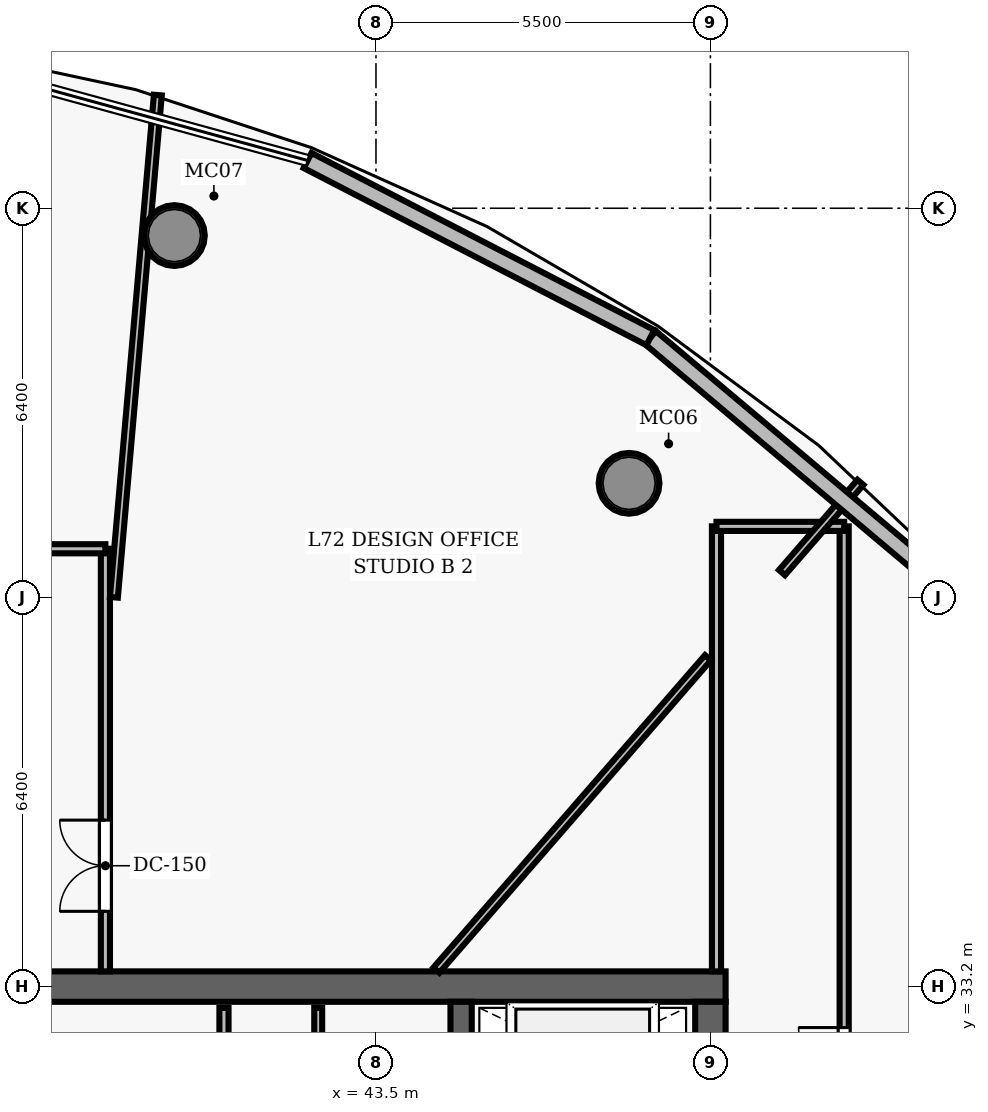
"""IFC4 building model, lengths in metres.
Left out: names, types, materials, properties, quantities, classifications, styles, units other than length and angle.
Written with IfcOpenShell. Run it as: python <this file> out.ifc"""

import sys

from ifc_helpers import new_model, si_unit, direction, frame, frame_2d, origin, origin_2d, place, context, subcontext, project, spatial, rectangle, hollow_circle, extrude, element, fill, save


model = new_model("IFC4")
c1 = context("Model", 3, precision=1e-05, world=origin(), true_north=direction((0.0, 1.0)))
c2 = subcontext(c1, "Body", "Model", "MODEL_VIEW")
j1 = project(units=[si_unit("LENGTHUNIT", "METRE"), si_unit("PLANEANGLEUNIT", "RADIAN")], contexts=[c1])
p1 = place(None, origin())
s1 = spatial("IfcSite", under=j1, at=p1, CompositionType="ELEMENT")
p2 = place(p1, origin())
s2 = spatial("IfcBuilding", under=s1, at=p2, CompositionType="ELEMENT")
p3 = place(p2, frame((0.0, 0.0, 284.4)))
s3 = spatial("IfcBuildingStorey", under=s2, at=p3, CompositionType="ELEMENT", Elevation=284.4)
p4 = place(p3, frame((26.75, 33.2, 0.0), z_axis=(0.0, 0.0, 1.0), x_axis=(1.0, 0.0, 0.0)))
e1 = element("IfcWall", 1, at=p4, inside=s3, PredefinedType="SHEAR", context=c2, shape_type="SweptSolid", body=[
    extrude(rectangle(XDim=22.5, YDim=0.5, at=frame_2d((11.25, 0.0))), origin(), (0.0, 0.0, 1.0), 3.85),
])
p5 = place(p3, frame((49.0, 19.05, 0.0), z_axis=(0.0, 0.0, 1.0), x_axis=(0.0, 1.0, 0.0)))
e2 = element("IfcWall", 2, at=p5, inside=s3, PredefinedType="SHEAR", context=c2, shape_type="SweptSolid", body=[
    extrude(rectangle(XDim=13.9, YDim=0.5, at=frame_2d((6.95, 0.0))), origin(), (0.0, 0.0, 1.0), 3.85),
])
p6 = place(p5, frame((8.2, 0.0, 0.0)))
e3 = element("IfcOpeningElement", 3, at=p6, cuts=e2, PredefinedType="OPENING", context=c2, shape_type="SweptSolid", body=[
    extrude(rectangle(XDim=1.05, YDim=2.15, at=frame_2d((0.525, 1.075))), frame((0.0, 0.26, 0.0), z_axis=(0.0, -1.0, 0.0), x_axis=(1.0, 0.0, 0.0)), (0.0, 0.0, 1.0), 0.52),
])
p7 = place(p3, frame((44.9, 19.05, 0.0), z_axis=(0.0, 0.0, 1.0), x_axis=(0.0, 1.0, 0.0)))
e4 = element("IfcWall", 4, at=p7, inside=s3, PredefinedType="SHEAR", context=c2, shape_type="SweptSolid", body=[
    extrude(rectangle(XDim=13.9, YDim=0.35, at=frame_2d((6.95, 0.0))), origin(), (0.0, 0.0, 1.0), 3.85),
])
for number, where, z_axis, x_axis in (
    (5, (47.662, 41.477, 0.0), (0.0, 0.0, 1.0), (1.0, 0.0, 0.0)),
    (6, (40.185, 45.551, 0.0), (0.0, 0.0, 1.0), (1.0, 0.0, 0.0)),
):
    element("IfcColumn", number, at=place(p3, frame(where, z_axis=z_axis, x_axis=x_axis)), inside=s3, PredefinedType="COLUMN", context=c2, shape_type="SweptSolid", body=[
        extrude(hollow_circle(Radius=0.5, WallThickness=0.045, at=origin_2d()), origin(), (0.0, 0.0, 1.0), 3.85),
    ])
p8 = place(p3, frame((41.0, 28.95, 0.0), z_axis=(0.0, 0.0, 1.0), x_axis=(0.0, 1.0, 0.0)))
e7 = element("IfcWall", 7, at=p8, inside=s3, PredefinedType="PARTITIONING", context=c2, shape_type="SweptSolid", body=[
    extrude(rectangle(XDim=3.9, YDim=0.15, at=frame_2d((1.95, 0.0))), origin(), (0.0, 0.0, 1.0), 3.04),
])
p9 = place(p8, frame((0.7, 0.0, 0.0)))
e8 = element("IfcOpeningElement", 8, at=p9, cuts=e7, PredefinedType="OPENING", context=c2, shape_type="SweptSolid", body=[
    extrude(rectangle(XDim=0.85, YDim=2.1, at=frame_2d((0.425, 1.05))), frame((0.0, 0.085, 0.0), z_axis=(0.0, -1.0, 0.0), x_axis=(1.0, 0.0, 0.0)), (0.0, 0.0, 1.0), 0.17),
])
p10 = place(p3, frame((42.55, 28.1, 0.0), z_axis=(0.0, 0.0, 1.0), x_axis=(0.0, 1.0, 0.0)))
e9 = element("IfcWall", 9, at=p10, inside=s3, PredefinedType="PARTITIONING", context=c2, shape_type="SweptSolid", body=[
    extrude(rectangle(XDim=4.75, YDim=0.13, at=frame_2d((2.375, 0.0))), origin(), (0.0, 0.0, 1.0), 3.04),
])
p11 = place(p10, frame((1.4, 0.0, 0.0)))
e10 = element("IfcOpeningElement", 10, at=p11, cuts=e9, PredefinedType="OPENING", context=c2, shape_type="SweptSolid", body=[
    extrude(rectangle(XDim=0.85, YDim=2.1, at=frame_2d((0.425, 1.05))), frame((0.0, 0.075, 0.0), z_axis=(0.0, -1.0, 0.0), x_axis=(1.0, 0.0, 0.0)), (0.0, 0.0, 1.0), 0.15),
])
p12 = place(p3, frame((51.2, 10.6, 0.0), z_axis=(0.0, 0.0, 1.0), x_axis=(0.0, 1.0, 0.0)))
e11 = element("IfcWall", 11, at=p12, inside=s3, PredefinedType="PARTITIONING", context=c2, shape_type="SweptSolid", body=[
    extrude(rectangle(XDim=30.168, YDim=0.15, at=frame_2d((15.084, 0.0))), origin(), (0.0, 0.0, 1.0), 3.04),
])
p13 = place(p12, frame((20.426, 0.0, 0.0)))
e12 = element("IfcOpeningElement", 12, at=p13, cuts=e11, PredefinedType="OPENING", context=c2, shape_type="SweptSolid", body=[
    extrude(rectangle(XDim=1.5, YDim=2.2, at=frame_2d((0.75, 1.1))), frame((0.0, 0.085, 0.0), z_axis=(0.0, -1.0, 0.0), x_axis=(1.0, 0.0, 0.0)), (0.0, 0.0, 1.0), 0.17),
])
p14 = place(p12, frame((11.03, 0.0, 0.0)))
e13 = element("IfcOpeningElement", 13, at=p14, cuts=e11, PredefinedType="OPENING", context=c2, shape_type="SweptSolid", body=[
    extrude(rectangle(XDim=1.5, YDim=2.2, at=frame_2d((0.75, 1.1))), frame((0.0, 0.085, 0.0), z_axis=(0.0, -1.0, 0.0), x_axis=(1.0, 0.0, 0.0)), (0.0, 0.0, 1.0), 0.17),
])
p15 = place(p3, frame((49.1, 33.45, 0.0), z_axis=(0.0, 0.0, 1.0), x_axis=(0.0, 1.0, 0.0)))
e14 = element("IfcWall", 14, at=p15, inside=s3, PredefinedType="PARTITIONING", context=c2, shape_type="SweptSolid", body=[
    extrude(rectangle(XDim=7.318, YDim=0.15, at=frame_2d((3.659, 0.0))), origin(), (0.0, 0.0, 1.0), 3.04),
])
p16 = place(p3, frame((49.1, 40.768, 0.0), z_axis=(0.0, 0.0, 1.0), x_axis=(1.0, 0.0, 0.0)))
e15 = element("IfcWall", 15, at=p16, inside=s3, PredefinedType="PARTITIONING", context=c2, shape_type="SweptSolid", body=[
    extrude(rectangle(XDim=2.1, YDim=0.15, at=frame_2d((1.05, 0.0))), origin(), (0.0, 0.0, 1.0), 3.04),
])
p17 = place(p3, frame((39.05, 33.45, 0.0), z_axis=(0.0, 0.0, 1.0), x_axis=(0.0, 1.0, 0.0)))
e16 = element("IfcWall", 16, at=p17, inside=s3, PredefinedType="PARTITIONING", context=c2, shape_type="SweptSolid", body=[
    extrude(rectangle(XDim=6.95, YDim=0.15, at=frame_2d((3.475, 0.0))), origin(), (0.0, 0.0, 1.0), 3.04),
])
p18 = place(p17, frame((0.988, 0.0, 0.0)))
e17 = element("IfcOpeningElement", 17, at=p18, cuts=e16, PredefinedType="OPENING", context=c2, shape_type="SweptSolid", body=[
    extrude(rectangle(XDim=1.5, YDim=2.2, at=frame_2d((0.75, 1.1))), frame((0.0, 0.085, 0.0), z_axis=(0.0, -1.0, 0.0), x_axis=(1.0, 0.0, 0.0)), (0.0, 0.0, 1.0), 0.17),
])
p19 = place(p3, frame((36.95, 40.4, 0.0), z_axis=(0.0, 0.0, 1.0), x_axis=(1.0, 0.0, 0.0)))
e18 = element("IfcWall", 18, at=p19, inside=s3, PredefinedType="PARTITIONING", context=c2, shape_type="SweptSolid", body=[
    extrude(rectangle(XDim=2.1, YDim=0.15, at=frame_2d((1.05, 0.0))), origin(), (0.0, 0.0, 1.0), 3.04),
])
p20 = place(p3, frame((44.494, 33.47, 0.0), z_axis=(0.0, 0.0, 1.0), x_axis=(0.656056181598, 0.754712055414, 0.0)))
e19 = element("IfcWall", 19, at=p20, inside=s3, PredefinedType="PARTITIONING", context=c2, shape_type="SweptSolid", body=[
    extrude(rectangle(XDim=6.808, YDim=0.13, at=frame_2d((3.404, 0.0))), origin(), (0.0, 0.0, 1.0), 3.04),
])
p21 = place(p3, frame((50.177, 40.008, 0.0), z_axis=(0.0, 0.0, 1.0), x_axis=(0.65617256833, 0.754610866984, 0.0)))
e20 = element("IfcWall", 20, at=p21, inside=s3, PredefinedType="PARTITIONING", context=c2, shape_type="SweptSolid", body=[
    extrude(rectangle(XDim=1.967, YDim=0.13, at=frame_2d((0.983, 0.0))), origin(), (0.0, 0.0, 1.0), 3.04),
])
p22 = place(p3, frame((39.19, 39.602, 0.0), z_axis=(0.0, 0.0, 1.0), x_axis=(0.087163297365, 0.996194037119, 0.0)))
e21 = element("IfcWall", 21, at=p22, inside=s3, PredefinedType="PARTITIONING", context=c2, shape_type="SweptSolid", body=[
    extrude(rectangle(XDim=8.291, YDim=0.13, at=frame_2d((4.146, 0.0))), origin(), (0.0, 0.0, 1.0), 3.04),
])
p23 = place(p3, frame((48.012, 43.873, 0.0), z_axis=(0.0, 0.0, 1.0), x_axis=(0.765007232119, -0.644021688148, 0.0)))
e22 = element("IfcWall", 22, at=p23, inside=s3, PredefinedType="SOLIDWALL", context=c2, shape_type="SweptSolid", body=[
    extrude(rectangle(XDim=6.526, YDim=0.28, at=frame_2d((3.263, 0.0))), origin(), (0.0, 0.0, 1.0), 3.625),
])
p24 = place(p3, frame((42.375, 46.785, 0.0), z_axis=(0.0, 0.0, 1.0), x_axis=(0.888431398434, -0.459009422862, 0.0)))
e23 = element("IfcWall", 23, at=p24, inside=s3, PredefinedType="SOLIDWALL", context=c2, shape_type="SweptSolid", body=[
    extrude(rectangle(XDim=6.345, YDim=0.28, at=frame_2d((3.173, 0.0))), origin(), (0.0, 0.0, 1.0), 3.625),
])
p25 = place(p13, origin())
e24 = element("IfcDoor", 24, at=p25, inside=s3, OperationType="DOUBLE_DOOR_SINGLE_SWING", PredefinedType="DOOR", context=c2, shape_type="SweptSolid", body=[
    extrude(rectangle(XDim=1.5, YDim=2.2, at=frame_2d((0.75, 1.1))), frame((0.0, 0.025, 0.0), z_axis=(0.0, -1.0, 0.0), x_axis=(1.0, 0.0, 0.0)), (0.0, 0.0, 1.0), 0.05),
])
fill(e12, e24)
p26 = place(p18, origin())
e25 = element("IfcDoor", 25, at=p26, inside=s3, OperationType="DOUBLE_DOOR_SINGLE_SWING", PredefinedType="DOOR", context=c2, shape_type="SweptSolid", body=[
    extrude(rectangle(XDim=1.5, YDim=2.2, at=frame_2d((0.75, 1.1))), frame((0.0, 0.025, 0.0), z_axis=(0.0, -1.0, 0.0), x_axis=(1.0, 0.0, 0.0)), (0.0, 0.0, 1.0), 0.05),
])
fill(e17, e25)
save(model, sys.argv[1])
